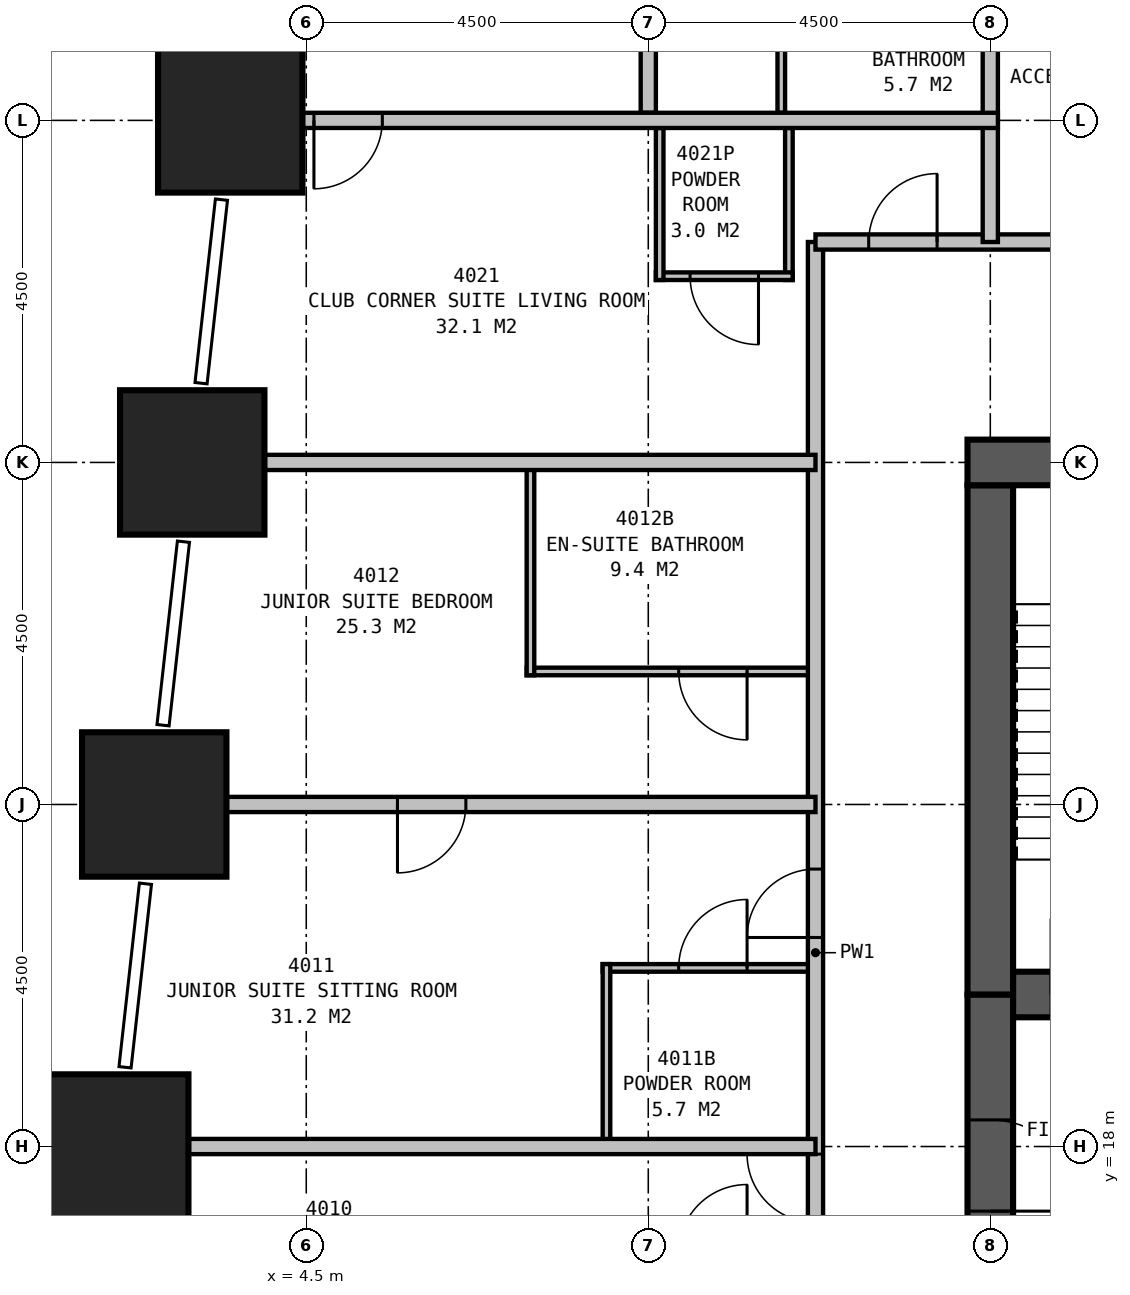
"""IFC4 building model, lengths in metres.
Left out: names, types, materials, properties, quantities, classifications, styles, units other than length and angle.
Written with IfcOpenShell. Run it as: python <this file> out.ifc"""

import sys

from ifc_helpers import new_model, si_unit, direction, frame, frame_2d, origin, origin_2d, place, context, subcontext, project, spatial, rectangle, extrude, element, fill, save


model = new_model("IFC4")
c1 = context("Model", 3, precision=1e-05, world=origin(), true_north=direction((0.0, 1.0)))
c2 = subcontext(c1, "Body", "Model", "MODEL_VIEW")
j1 = project(units=[si_unit("LENGTHUNIT", "METRE"), si_unit("PLANEANGLEUNIT", "RADIAN")], contexts=[c1])
p1 = place(None, origin())
s1 = spatial("IfcSite", under=j1, at=p1, CompositionType="ELEMENT")
p2 = place(p1, origin())
s2 = spatial("IfcBuilding", under=s1, at=p2, CompositionType="ELEMENT")
p3 = place(p2, frame((0.0, 0.0, 157.9)))
s3 = spatial("IfcBuildingStorey", under=s2, at=p3, CompositionType="ELEMENT", Elevation=157.9)
for number, where, z_axis, x_axis in (
    (1, (3.5, 31.5, 0.0), (0.0, 0.0, 1.0), (1.0, 0.0, 0.0)),
    (2, (3.0, 27.0, 0.0), (0.0, 0.0, 1.0), (1.0, 0.0, 0.0)),
    (3, (2.5, 22.5, 0.0), (0.0, 0.0, 1.0), (1.0, 0.0, 0.0)),
    (4, (2.0, 18.0, 0.0), (0.0, 0.0, 1.0), (1.0, 0.0, 0.0)),
):
    element("IfcColumn", number, at=place(p3, frame(where, z_axis=z_axis, x_axis=x_axis)), inside=s3, PredefinedType="COLUMN", context=c2, shape_type="SweptSolid", body=[
        extrude(rectangle(XDim=1.9, YDim=1.9, at=origin_2d()), origin(), (0.0, 0.0, 1.0), 4.5),
    ])
p4 = place(p3, frame((36.3, 27.0, 0.0), z_axis=(0.0, 0.0, 1.0), x_axis=(-1.0, 0.0, 0.0)))
e5 = element("IfcWall", 5, at=p4, inside=s3, PredefinedType="SHEAR", context=c2, shape_type="SweptSolid", body=[
    extrude(rectangle(XDim=23.1, YDim=0.6, at=frame_2d((11.55, 0.0))), origin(), (0.0, 0.0, 1.0), 4.5),
])
p5 = place(p4, frame((17.05, 0.0, 0.0)))
e6 = element("IfcOpeningElement", 6, at=p5, cuts=e5, PredefinedType="OPENING", context=c2, shape_type="SweptSolid", body=[
    extrude(rectangle(XDim=1.0, YDim=2.1, at=frame_2d((0.5, 1.05))), frame((0.0, 0.31, 0.0), z_axis=(0.0, -1.0, 0.0), x_axis=(1.0, 0.0, 0.0)), (0.0, 0.0, 1.0), 0.62),
])
p6 = place(p4, frame((12.05, 0.0, 0.0)))
e7 = element("IfcOpeningElement", 7, at=p6, cuts=e5, PredefinedType="OPENING", context=c2, shape_type="SweptSolid", body=[
    extrude(rectangle(XDim=1.0, YDim=2.1, at=frame_2d((0.5, 1.05))), frame((0.0, 0.31, 0.0), z_axis=(0.0, -1.0, 0.0), x_axis=(1.0, 0.0, 0.0)), (0.0, 0.0, 1.0), 0.62),
])
p7 = place(p4, frame((7.05, 0.0, 0.0)))
e8 = element("IfcOpeningElement", 8, at=p7, cuts=e5, PredefinedType="OPENING", context=c2, shape_type="SweptSolid", body=[
    extrude(rectangle(XDim=1.0, YDim=2.1, at=frame_2d((0.5, 1.05))), frame((0.0, 0.31, 0.0), z_axis=(0.0, -1.0, 0.0), x_axis=(1.0, 0.0, 0.0)), (0.0, 0.0, 1.0), 0.62),
])
p8 = place(p3, frame((13.8, 20.0, 0.0), z_axis=(0.0, 0.0, 1.0), x_axis=(1.0, 0.0, 0.0)))
e9 = element("IfcWall", 9, at=p8, inside=s3, PredefinedType="SHEAR", context=c2, shape_type="SweptSolid", body=[
    extrude(rectangle(XDim=21.9, YDim=0.6, at=frame_2d((10.95, 0.0))), origin(), (0.0, 0.0, 1.0), 4.5),
])
p9 = place(p8, frame((0.5, 0.0, 0.0)))
e10 = element("IfcOpeningElement", 10, at=p9, cuts=e9, PredefinedType="OPENING", context=c2, shape_type="SweptSolid", body=[
    extrude(rectangle(XDim=1.0, YDim=2.1, at=frame_2d((0.5, 1.05))), frame((0.0, 0.31, 0.0), z_axis=(0.0, -1.0, 0.0), x_axis=(1.0, 0.0, 0.0)), (0.0, 0.0, 1.0), 0.62),
])
p10 = place(p8, frame((20.5, 0.0, 0.0)))
e11 = element("IfcOpeningElement", 11, at=p10, cuts=e9, PredefinedType="OPENING", context=c2, shape_type="SweptSolid", body=[
    extrude(rectangle(XDim=1.0, YDim=2.1, at=frame_2d((0.5, 1.05))), frame((0.0, 0.31, 0.0), z_axis=(0.0, -1.0, 0.0), x_axis=(1.0, 0.0, 0.0)), (0.0, 0.0, 1.0), 0.62),
])
p11 = place(p8, frame((9.15, 0.0, 0.0)))
e12 = element("IfcOpeningElement", 12, at=p11, cuts=e9, PredefinedType="OPENING", context=c2, shape_type="SweptSolid", body=[
    extrude(rectangle(XDim=1.1, YDim=2.1, at=frame_2d((0.55, 1.05))), frame((0.0, 0.31, 0.0), z_axis=(0.0, -1.0, 0.0), x_axis=(1.0, 0.0, 0.0)), (0.0, 0.0, 1.0), 0.62),
])
p12 = place(p8, frame((11.65, 0.0, 0.0)))
e13 = element("IfcOpeningElement", 13, at=p12, cuts=e9, PredefinedType="OPENING", context=c2, shape_type="SweptSolid", body=[
    extrude(rectangle(XDim=1.1, YDim=2.1, at=frame_2d((0.55, 1.05))), frame((0.0, 0.31, 0.0), z_axis=(0.0, -1.0, 0.0), x_axis=(1.0, 0.0, 0.0)), (0.0, 0.0, 1.0), 0.62),
])
p13 = place(p8, frame((14.15, 0.0, 0.0)))
e14 = element("IfcOpeningElement", 14, at=p13, cuts=e9, PredefinedType="OPENING", context=c2, shape_type="SweptSolid", body=[
    extrude(rectangle(XDim=1.1, YDim=2.1, at=frame_2d((0.55, 1.05))), frame((0.0, 0.31, 0.0), z_axis=(0.0, -1.0, 0.0), x_axis=(1.0, 0.0, 0.0)), (0.0, 0.0, 1.0), 0.62),
])
p14 = place(p8, frame((16.65, 0.0, 0.0)))
e15 = element("IfcOpeningElement", 15, at=p14, cuts=e9, PredefinedType="OPENING", context=c2, shape_type="SweptSolid", body=[
    extrude(rectangle(XDim=1.1, YDim=2.1, at=frame_2d((0.55, 1.05))), frame((0.0, 0.31, 0.0), z_axis=(0.0, -1.0, 0.0), x_axis=(1.0, 0.0, 0.0)), (0.0, 0.0, 1.0), 0.62),
])
p15 = place(p8, frame((4.75, 0.0, 0.0)))
e16 = element("IfcOpeningElement", 16, at=p15, cuts=e9, PredefinedType="OPENING", context=c2, shape_type="SweptSolid", body=[
    extrude(rectangle(XDim=1.0, YDim=2.1, at=frame_2d((0.5, 1.05))), frame((0.0, 0.31, 0.0), z_axis=(0.0, -1.0, 0.0), x_axis=(1.0, 0.0, 0.0)), (0.0, 0.0, 1.0), 0.62),
])
p16 = place(p8, frame((6.7, 0.0, 0.0)))
e17 = element("IfcOpeningElement", 17, at=p16, cuts=e9, PredefinedType="OPENING", context=c2, shape_type="SweptSolid", body=[
    extrude(rectangle(XDim=1.0, YDim=2.1, at=frame_2d((0.5, 1.05))), frame((0.0, 0.31, 0.0), z_axis=(0.0, -1.0, 0.0), x_axis=(1.0, 0.0, 0.0)), (0.0, 0.0, 1.0), 0.62),
])
p17 = place(p3, frame((13.5, 26.7, 0.0), z_axis=(0.0, 0.0, 1.0), x_axis=(0.0, -1.0, 0.0)))
e18 = element("IfcWall", 18, at=p17, inside=s3, PredefinedType="SHEAR", context=c2, shape_type="SweptSolid", body=[
    extrude(rectangle(XDim=6.7, YDim=0.6, at=frame_2d((3.35, 0.0))), origin(), (0.0, 0.0, 1.0), 4.5),
])
p18 = place(p3, frame((13.5, 20.0, 0.0), z_axis=(0.0, 0.0, 1.0), x_axis=(0.0, -1.0, 0.0)))
e19 = element("IfcWall", 19, at=p18, inside=s3, PredefinedType="SHEAR", context=c2, shape_type="SweptSolid", body=[
    extrude(rectangle(XDim=3.5, YDim=0.6, at=frame_2d((1.75, 0.0))), origin(), (0.0, 0.0, 1.0), 4.5),
])
p19 = place(p18, frame((1.65, 0.0, 0.0)))
e20 = element("IfcOpeningElement", 20, at=p19, cuts=e19, PredefinedType="OPENING", context=c2, shape_type="SweptSolid", body=[
    extrude(rectangle(XDim=1.2, YDim=2.1, at=frame_2d((0.6, 1.05))), frame((0.0, 0.31, 0.0), z_axis=(0.0, -1.0, 0.0), x_axis=(1.0, 0.0, 0.0)), (0.0, 0.0, 1.0), 0.62),
])
p20 = place(p3, frame((11.2, 29.9, 0.0), z_axis=(0.0, 0.0, 1.0), x_axis=(1.0, 0.0, 0.0)))
e21 = element("IfcWall", 21, at=p20, inside=s3, PredefinedType="PARTITIONING", context=c2, shape_type="SweptSolid", body=[
    extrude(rectangle(XDim=27.1, YDim=0.2, at=frame_2d((13.55, 0.0))), origin(), (0.0, 0.0, 1.0), 4.25),
])
p21 = place(p20, frame((6.45, 0.0, 0.0), z_axis=(0.0, 0.0, 1.0), x_axis=(-1.0, 0.0, 0.0)))
e22 = element("IfcOpeningElement", 22, at=p21, cuts=e21, PredefinedType="OPENING", context=c2, shape_type="SweptSolid", body=[
    extrude(rectangle(XDim=1.0, YDim=2.1, at=frame_2d((0.5, 1.05))), frame((0.0, 0.11, 0.0), z_axis=(0.0, -1.0, 0.0), x_axis=(1.0, 0.0, 0.0)), (0.0, 0.0, 1.0), 0.22),
])
p22 = place(p20, frame((25.5, 0.0, 0.0)))
e23 = element("IfcOpeningElement", 23, at=p22, cuts=e21, PredefinedType="OPENING", context=c2, shape_type="SweptSolid", body=[
    extrude(rectangle(XDim=0.9, YDim=2.1, at=frame_2d((0.45, 1.05))), frame((0.0, 0.11, 0.0), z_axis=(0.0, -1.0, 0.0), x_axis=(1.0, 0.0, 0.0)), (0.0, 0.0, 1.0), 0.22),
])
p23 = place(p20, frame((0.7, 0.0, 0.0)))
e24 = element("IfcOpeningElement", 24, at=p23, cuts=e21, PredefinedType="OPENING", context=c2, shape_type="SweptSolid", body=[
    extrude(rectangle(XDim=0.9, YDim=2.1, at=frame_2d((0.45, 1.05))), frame((0.0, 0.11, 0.0), z_axis=(0.0, -1.0, 0.0), x_axis=(1.0, 0.0, 0.0)), (0.0, 0.0, 1.0), 0.22),
])
p24 = place(p3, frame((11.2, 11.2, 0.0), z_axis=(0.0, 0.0, 1.0), x_axis=(0.0, 1.0, 0.0)))
e25 = element("IfcWall", 25, at=p24, inside=s3, PredefinedType="PARTITIONING", context=c2, shape_type="SweptSolid", body=[
    extrude(rectangle(XDim=18.7, YDim=0.2, at=frame_2d((9.35, 0.0))), origin(), (0.0, 0.0, 1.0), 4.25),
])
p25 = place(p24, frame((5.8, 0.0, 0.0)))
e26 = element("IfcOpeningElement", 26, at=p25, cuts=e25, PredefinedType="OPENING", context=c2, shape_type="SweptSolid", body=[
    extrude(rectangle(XDim=0.9, YDim=2.1, at=frame_2d((0.45, 1.05))), frame((0.0, 0.11, 0.0), z_axis=(0.0, -1.0, 0.0), x_axis=(1.0, 0.0, 0.0)), (0.0, 0.0, 1.0), 0.22),
])
p26 = place(p24, frame((9.55, 0.0, 0.0)))
e27 = element("IfcOpeningElement", 27, at=p26, cuts=e25, PredefinedType="OPENING", context=c2, shape_type="SweptSolid", body=[
    extrude(rectangle(XDim=0.9, YDim=2.1, at=frame_2d((0.45, 1.05))), frame((0.0, 0.11, 0.0), z_axis=(0.0, -1.0, 0.0), x_axis=(1.0, 0.0, 0.0)), (0.0, 0.0, 1.0), 0.22),
])
p27 = place(p3, frame((11.2, 18.0, 0.0), z_axis=(0.0, 0.0, 1.0), x_axis=(-1.0, 0.0, 0.0)))
e28 = element("IfcWall", 28, at=p27, inside=s3, PredefinedType="PARTITIONING", context=c2, shape_type="SweptSolid", body=[
    extrude(rectangle(XDim=9.199, YDim=0.2, at=frame_2d((4.6, 0.0))), origin(), (0.0, 0.0, 1.0), 3.25),
])
p28 = place(p3, frame((11.2, 22.5, 0.0), z_axis=(0.0, 0.0, 1.0), x_axis=(-1.0, 0.0, 0.0)))
e29 = element("IfcWall", 29, at=p28, inside=s3, PredefinedType="PARTITIONING", context=c2, shape_type="SweptSolid", body=[
    extrude(rectangle(XDim=8.699, YDim=0.2, at=frame_2d((4.35, 0.0))), origin(), (0.0, 0.0, 1.0), 3.25),
])
p29 = place(p28, frame((4.6, 0.0, 0.0)))
e30 = element("IfcOpeningElement", 30, at=p29, cuts=e29, PredefinedType="OPENING", context=c2, shape_type="SweptSolid", body=[
    extrude(rectangle(XDim=0.9, YDim=2.1, at=frame_2d((0.45, 1.05))), frame((0.0, 0.11, 0.0), z_axis=(0.0, -1.0, 0.0), x_axis=(1.0, 0.0, 0.0)), (0.0, 0.0, 1.0), 0.22),
])
p30 = place(p3, frame((8.45, 18.0, 0.0), z_axis=(0.0, 0.0, 1.0), x_axis=(0.0, 1.0, 0.0)))
e31 = element("IfcWall", 31, at=p30, inside=s3, PredefinedType="PLUMBINGWALL", context=c2, shape_type="SweptSolid", body=[
    extrude(rectangle(XDim=2.4, YDim=0.1, at=frame_2d((1.2, 0.0))), origin(), (0.0, 0.0, 1.0), 4.25),
])
p31 = place(p3, frame((11.2, 20.35, 0.0), z_axis=(0.0, 0.0, 1.0), x_axis=(-1.0, 0.0, 0.0)))
e32 = element("IfcWall", 32, at=p31, inside=s3, PredefinedType="PLUMBINGWALL", context=c2, shape_type="SweptSolid", body=[
    extrude(rectangle(XDim=2.8, YDim=0.1, at=frame_2d((1.4, 0.0))), origin(), (0.0, 0.0, 1.0), 4.25),
])
p32 = place(p31, frame((1.8, 0.0, 0.0), z_axis=(0.0, 0.0, 1.0), x_axis=(-1.0, 0.0, 0.0)))
e33 = element("IfcOpeningElement", 33, at=p32, cuts=e32, PredefinedType="OPENING", context=c2, shape_type="SweptSolid", body=[
    extrude(rectangle(XDim=0.9, YDim=2.1, at=frame_2d((0.45, 1.05))), frame((0.0, 0.06, 0.0), z_axis=(0.0, -1.0, 0.0), x_axis=(1.0, 0.0, 0.0)), (0.0, 0.0, 1.0), 0.12),
])
p33 = place(p3, frame((7.45, 24.2, 0.0), z_axis=(0.0, 0.0, 1.0), x_axis=(0.0, 1.0, 0.0)))
e34 = element("IfcWall", 34, at=p33, inside=s3, PredefinedType="PLUMBINGWALL", context=c2, shape_type="SweptSolid", body=[
    extrude(rectangle(XDim=2.8, YDim=0.1, at=frame_2d((1.4, 0.0))), origin(), (0.0, 0.0, 1.0), 4.25),
])
p34 = place(p3, frame((11.2, 24.25, 0.0), z_axis=(0.0, 0.0, 1.0), x_axis=(-1.0, 0.0, 0.0)))
e35 = element("IfcWall", 35, at=p34, inside=s3, PredefinedType="PLUMBINGWALL", context=c2, shape_type="SweptSolid", body=[
    extrude(rectangle(XDim=3.8, YDim=0.1, at=frame_2d((1.9, 0.0))), origin(), (0.0, 0.0, 1.0), 4.25),
])
p35 = place(p34, frame((0.9, 0.0, 0.0)))
e36 = element("IfcOpeningElement", 36, at=p35, cuts=e35, PredefinedType="OPENING", context=c2, shape_type="SweptSolid", body=[
    extrude(rectangle(XDim=0.9, YDim=2.1, at=frame_2d((0.45, 1.05))), frame((0.0, 0.06, 0.0), z_axis=(0.0, -1.0, 0.0), x_axis=(1.0, 0.0, 0.0)), (0.0, 0.0, 1.0), 0.12),
])
p36 = place(p3, frame((11.2, 27.0, 0.0), z_axis=(0.0, 0.0, 1.0), x_axis=(-1.0, 0.0, 0.0)))
e37 = element("IfcWall", 37, at=p36, inside=s3, PredefinedType="PARTITIONING", context=c2, shape_type="SweptSolid", body=[
    extrude(rectangle(XDim=7.977, YDim=0.2, at=frame_2d((3.988, 0.0))), origin(), (0.0, 0.0, 1.0), 2.95),
])
p37 = place(p3, frame((13.5, 29.9, 0.0), z_axis=(0.0, 0.0, 1.0), x_axis=(0.0, 1.0, 0.0)))
e38 = element("IfcWall", 38, at=p37, inside=s3, PredefinedType="PARTITIONING", context=c2, shape_type="SweptSolid", body=[
    extrude(rectangle(XDim=10.6, YDim=0.2, at=frame_2d((5.3, 0.0))), origin(), (0.0, 0.0, 1.0), 3.25),
])
p38 = place(p3, frame((13.6, 31.5, 0.0), z_axis=(0.0, 0.0, 1.0), x_axis=(-1.0, 0.0, 0.0)))
e39 = element("IfcWall", 39, at=p38, inside=s3, PredefinedType="PARTITIONING", context=c2, shape_type="SweptSolid", body=[
    extrude(rectangle(XDim=10.099, YDim=0.2, at=frame_2d((5.05, 0.0))), origin(), (0.0, 0.0, 1.0), 4.25),
])
p39 = place(p38, frame((8.099, 0.0, 0.0)))
e40 = element("IfcOpeningElement", 40, at=p39, cuts=e39, PredefinedType="OPENING", context=c2, shape_type="SweptSolid", body=[
    extrude(rectangle(XDim=0.9, YDim=2.1, at=frame_2d((0.45, 1.05))), frame((0.0, 0.11, 0.0), z_axis=(0.0, -1.0, 0.0), x_axis=(1.0, 0.0, 0.0)), (0.0, 0.0, 1.0), 0.22),
])
p40 = place(p3, frame((9.15, 31.4, 0.0), z_axis=(0.0, 0.0, 1.0), x_axis=(0.0, -1.0, 0.0)))
e41 = element("IfcWall", 41, at=p40, inside=s3, PredefinedType="PLUMBINGWALL", context=c2, shape_type="SweptSolid", body=[
    extrude(rectangle(XDim=2.0, YDim=0.1, at=frame_2d((1.0, 0.0))), origin(), (0.0, 0.0, 1.0), 3.25),
])
p41 = place(p3, frame((10.85, 31.4, 0.0), z_axis=(0.0, 0.0, 1.0), x_axis=(0.0, -1.0, 0.0)))
e42 = element("IfcWall", 42, at=p41, inside=s3, PredefinedType="PLUMBINGWALL", context=c2, shape_type="SweptSolid", body=[
    extrude(rectangle(XDim=2.0, YDim=0.1, at=frame_2d((1.0, 0.0))), origin(), (0.0, 0.0, 1.0), 4.25),
])
p42 = place(p3, frame((10.9, 29.45, 0.0), z_axis=(0.0, 0.0, 1.0), x_axis=(-1.0, 0.0, 0.0)))
e43 = element("IfcWall", 43, at=p42, inside=s3, PredefinedType="PLUMBINGWALL", context=c2, shape_type="SweptSolid", body=[
    extrude(rectangle(XDim=1.8, YDim=0.1, at=frame_2d((0.9, 0.0))), origin(), (0.0, 0.0, 1.0), 4.25),
])
p43 = place(p42, frame((0.45, 0.0, 0.0)))
e44 = element("IfcOpeningElement", 44, at=p43, cuts=e43, PredefinedType="OPENING", context=c2, shape_type="SweptSolid", body=[
    extrude(rectangle(XDim=0.9, YDim=2.1, at=frame_2d((0.45, 1.05))), frame((0.0, 0.06, 0.0), z_axis=(0.0, -1.0, 0.0), x_axis=(1.0, 0.0, 0.0)), (0.0, 0.0, 1.0), 0.12),
])
p44 = place(p3, frame((9.0, 31.6, 0.0), z_axis=(0.0, 0.0, 1.0), x_axis=(0.0, 1.0, 0.0)))
e45 = element("IfcWall", 45, at=p44, inside=s3, PredefinedType="PARTITIONING", context=c2, shape_type="SweptSolid", body=[
    extrude(rectangle(XDim=4.4, YDim=0.2, at=frame_2d((2.2, 0.0))), origin(), (0.0, 0.0, 1.0), 3.25),
])
p45 = place(p44, frame((2.4, 0.0, 0.0)))
e46 = element("IfcOpeningElement", 46, at=p45, cuts=e45, PredefinedType="OPENING", context=c2, shape_type="SweptSolid", body=[
    extrude(rectangle(XDim=0.9, YDim=2.1, at=frame_2d((0.45, 1.05))), frame((0.0, 0.11, 0.0), z_axis=(0.0, -1.0, 0.0), x_axis=(1.0, 0.0, 0.0)), (0.0, 0.0, 1.0), 0.22),
])
p46 = place(p3, frame((10.75, 31.6, 0.0), z_axis=(0.0, 0.0, 1.0), x_axis=(0.0, 1.0, 0.0)))
e47 = element("IfcWall", 47, at=p46, inside=s3, PredefinedType="PLUMBINGWALL", context=c2, shape_type="SweptSolid", body=[
    extrude(rectangle(XDim=2.3, YDim=0.1, at=frame_2d((1.15, 0.0))), origin(), (0.0, 0.0, 1.0), 4.25),
])
p47 = place(p23, origin())
e48 = element("IfcDoor", 48, at=p47, inside=s3, OperationType="SINGLE_SWING_RIGHT", PredefinedType="DOOR", context=c2, shape_type="SweptSolid", body=[
    extrude(rectangle(XDim=0.9, YDim=2.1, at=frame_2d((0.45, 1.05))), frame((0.0, 0.025, 0.0), z_axis=(0.0, -1.0, 0.0), x_axis=(1.0, 0.0, 0.0)), (0.0, 0.0, 1.0), 0.05),
])
fill(e24, e48)
p48 = place(p25, origin())
e49 = element("IfcDoor", 49, at=p48, inside=s3, OperationType="SINGLE_SWING_RIGHT", PredefinedType="DOOR", context=c2, shape_type="SweptSolid", body=[
    extrude(rectangle(XDim=0.9, YDim=2.1, at=frame_2d((0.45, 1.05))), frame((0.0, 0.025, 0.0), z_axis=(0.0, -1.0, 0.0), x_axis=(1.0, 0.0, 0.0)), (0.0, 0.0, 1.0), 0.05),
])
fill(e26, e49)
p49 = place(p26, origin())
e50 = element("IfcDoor", 50, at=p49, inside=s3, OperationType="SINGLE_SWING_LEFT", PredefinedType="DOOR", context=c2, shape_type="SweptSolid", body=[
    extrude(rectangle(XDim=0.9, YDim=2.1, at=frame_2d((0.45, 1.05))), frame((0.0, 0.025, 0.0), z_axis=(0.0, -1.0, 0.0), x_axis=(1.0, 0.0, 0.0)), (0.0, 0.0, 1.0), 0.05),
])
fill(e27, e50)
p50 = place(p29, origin())
e51 = element("IfcDoor", 51, at=p50, inside=s3, OperationType="SINGLE_SWING_RIGHT", PredefinedType="DOOR", context=c2, shape_type="SweptSolid", body=[
    extrude(rectangle(XDim=0.9, YDim=2.1, at=frame_2d((0.45, 1.05))), frame((0.0, 0.025, 0.0), z_axis=(0.0, -1.0, 0.0), x_axis=(1.0, 0.0, 0.0)), (0.0, 0.0, 1.0), 0.05),
])
fill(e30, e51)
p51 = place(p32, origin())
e52 = element("IfcDoor", 52, at=p51, inside=s3, OperationType="SINGLE_SWING_RIGHT", PredefinedType="DOOR", context=c2, shape_type="SweptSolid", body=[
    extrude(rectangle(XDim=0.9, YDim=2.1, at=frame_2d((0.45, 1.05))), frame((0.0, 0.025, 0.0), z_axis=(0.0, -1.0, 0.0), x_axis=(1.0, 0.0, 0.0)), (0.0, 0.0, 1.0), 0.05),
])
fill(e33, e52)
p52 = place(p35, origin())
e53 = element("IfcDoor", 53, at=p52, inside=s3, OperationType="SINGLE_SWING_LEFT", PredefinedType="DOOR", context=c2, shape_type="SweptSolid", body=[
    extrude(rectangle(XDim=0.9, YDim=2.1, at=frame_2d((0.45, 1.05))), frame((0.0, 0.025, 0.0), z_axis=(0.0, -1.0, 0.0), x_axis=(1.0, 0.0, 0.0)), (0.0, 0.0, 1.0), 0.05),
])
fill(e36, e53)
p53 = place(p39, origin())
e54 = element("IfcDoor", 54, at=p53, inside=s3, OperationType="SINGLE_SWING_RIGHT", PredefinedType="DOOR", context=c2, shape_type="SweptSolid", body=[
    extrude(rectangle(XDim=0.9, YDim=2.1, at=frame_2d((0.45, 1.05))), frame((0.0, 0.025, 0.0), z_axis=(0.0, -1.0, 0.0), x_axis=(1.0, 0.0, 0.0)), (0.0, 0.0, 1.0), 0.05),
])
fill(e40, e54)
p54 = place(p43, origin())
e55 = element("IfcDoor", 55, at=p54, inside=s3, OperationType="SINGLE_SWING_LEFT", PredefinedType="DOOR", context=c2, shape_type="SweptSolid", body=[
    extrude(rectangle(XDim=0.9, YDim=2.1, at=frame_2d((0.45, 1.05))), frame((0.0, 0.025, 0.0), z_axis=(0.0, -1.0, 0.0), x_axis=(1.0, 0.0, 0.0)), (0.0, 0.0, 1.0), 0.05),
])
fill(e44, e55)
p55 = place(p19, origin())
e56 = element("IfcDoor", 56, at=p55, inside=s3, OperationType="SINGLE_SWING_RIGHT", PredefinedType="DOOR", context=c2, shape_type="SweptSolid", body=[
    extrude(rectangle(XDim=1.2, YDim=2.1, at=frame_2d((0.6, 1.05))), frame((0.0, 0.3, 0.0), z_axis=(0.0, -1.0, 0.0), x_axis=(1.0, 0.0, 0.0)), (0.0, 0.0, 1.0), 0.6),
])
fill(e20, e56)
save(model, sys.argv[1])
